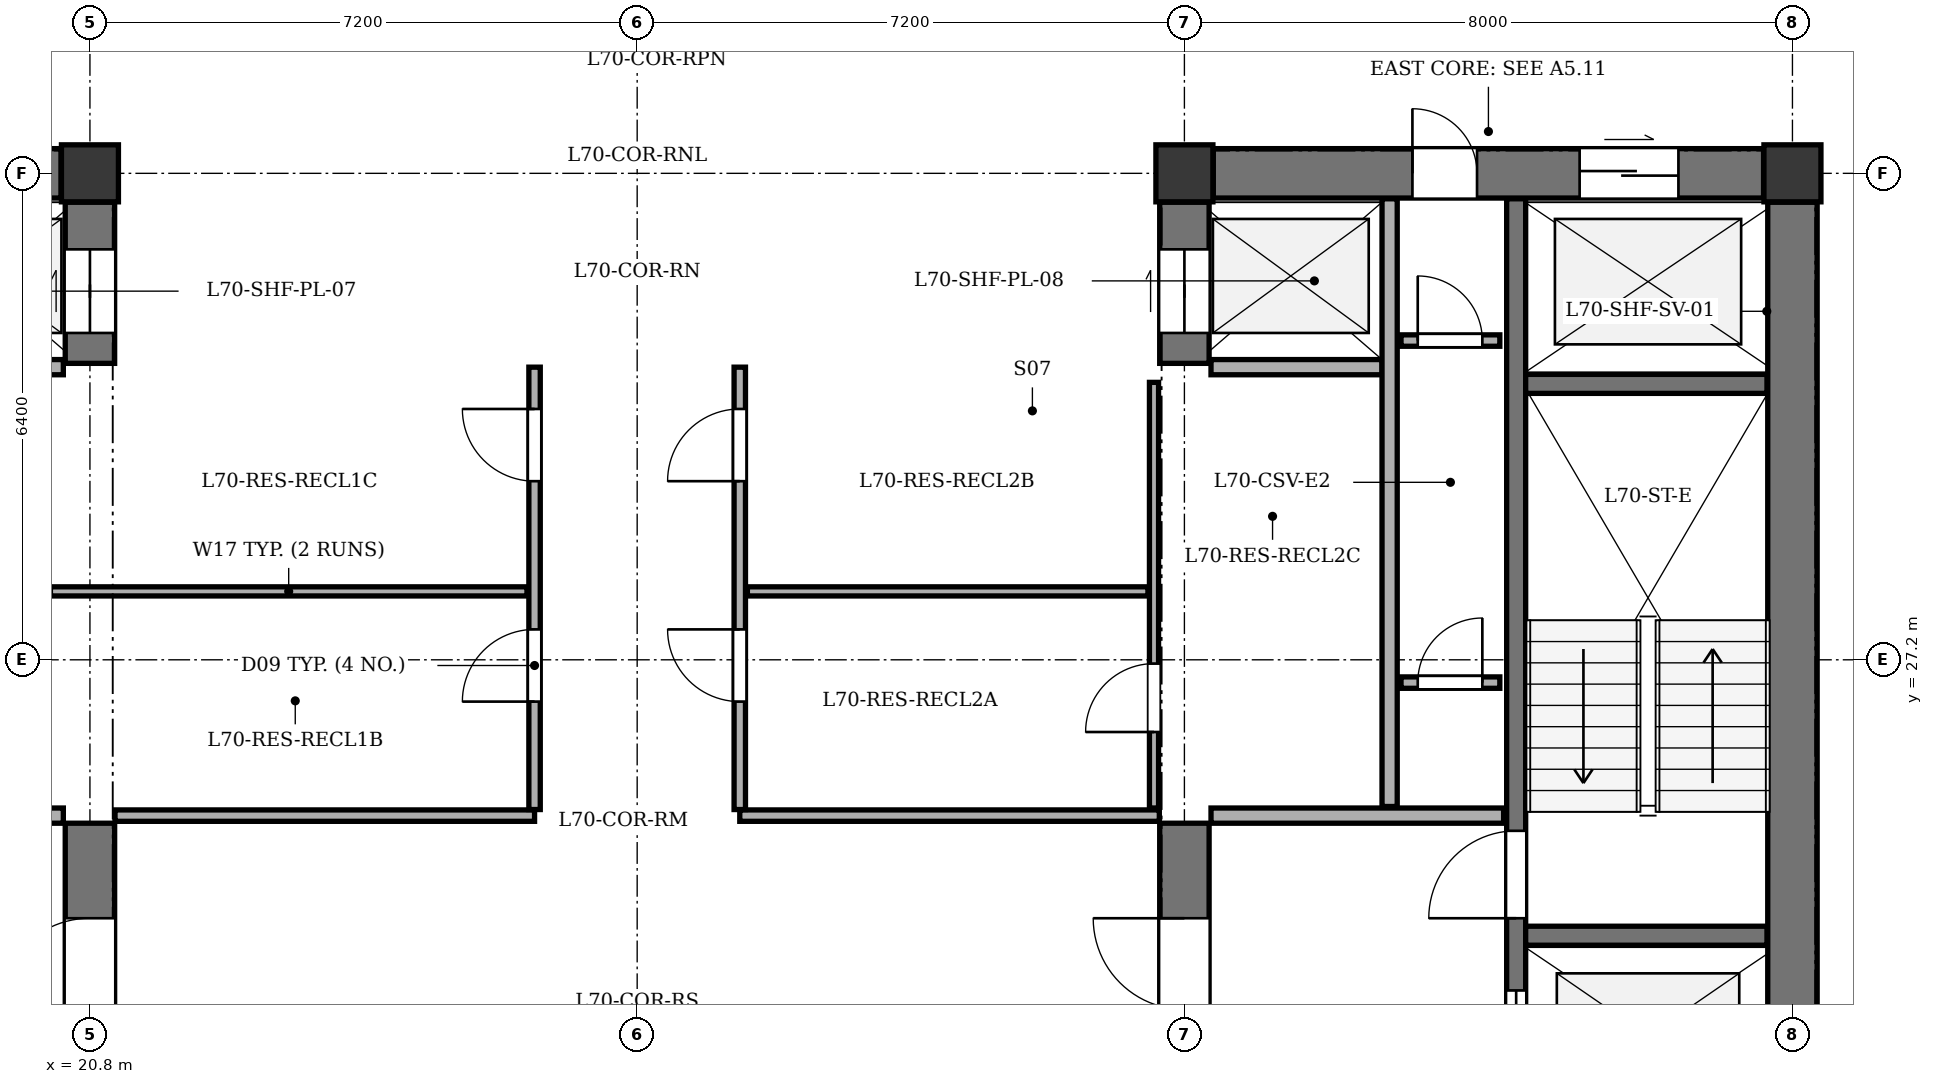
"""IFC4 building model, lengths in metres.
Left out: names, types, materials, properties, quantities, classifications, styles, units other than length and angle.
Written with IfcOpenShell. Run it as: python <this file> out.ifc"""

import sys

from ifc_helpers import new_model, si_unit, direction, frame, frame_2d, origin, origin_2d, place, context, subcontext, project, spatial, rectangle, extrude, element, fill, save


model = new_model("IFC4")
c1 = context("Model", 3, precision=1e-05, world=origin(), true_north=direction((0.0, 1.0)))
c2 = subcontext(c1, "Body", "Model", "MODEL_VIEW")
j1 = project(units=[si_unit("LENGTHUNIT", "METRE"), si_unit("PLANEANGLEUNIT", "RADIAN")], contexts=[c1])
p1 = place(None, origin())
s1 = spatial("IfcSite", under=j1, at=p1, CompositionType="ELEMENT")
p2 = place(p1, origin())
s2 = spatial("IfcBuilding", under=s1, at=p2, CompositionType="ELEMENT")
p3 = place(p2, frame((0.0, 0.0, 265.3)))
s3 = spatial("IfcBuildingStorey", under=s2, at=p3, CompositionType="ELEMENT", Elevation=265.3)
for number, where, z_axis, x_axis in (
    (1, (20.8, 33.6, 0.0), (0.0, 0.0, 1.0), (1.0, 0.0, 0.0)),
    (2, (35.2, 33.6, 0.0), (0.0, 0.0, 1.0), (1.0, 0.0, 0.0)),
    (3, (43.2, 33.6, 0.0), (0.0, 0.0, 1.0), (1.0, 0.0, 0.0)),
):
    element("IfcColumn", number, at=place(p3, frame(where, z_axis=z_axis, x_axis=x_axis)), inside=s3, PredefinedType="COLUMN", context=c2, shape_type="SweptSolid", body=[
        extrude(rectangle(XDim=0.75, YDim=0.75, at=origin_2d()), origin(), (0.0, 0.0, 1.0), 3.4),
    ])
p4 = place(p3, frame((13.18, 33.6, 0.0), z_axis=(0.0, 0.0, 1.0), x_axis=(1.0, 0.0, 0.0)))
e4 = element("IfcWall", 4, at=p4, inside=s3, PredefinedType="SHEAR", context=c2, shape_type="SweptSolid", body=[
    extrude(rectangle(XDim=7.24, YDim=0.65, at=frame_2d((3.62, 0.0))), origin(), (0.0, 0.0, 1.0), 2.95),
])
p5 = place(p4, frame((1.22, 0.0, 0.0)))
e5 = element("IfcOpeningElement", 5, at=p5, cuts=e4, PredefinedType="OPENING", context=c2, shape_type="SweptSolid", body=[
    extrude(rectangle(XDim=0.85, YDim=2.02, at=frame_2d((0.425, 1.01))), frame((0.0, 0.335, 0.0), z_axis=(0.0, -1.0, 0.0), x_axis=(1.0, 0.0, 0.0)), (0.0, 0.0, 1.0), 0.67),
])
p6 = place(p3, frame((20.8, 21.18, 0.0), z_axis=(0.0, 0.0, 1.0), x_axis=(0.0, 1.0, 0.0)))
e6 = element("IfcWall", 6, at=p6, inside=s3, PredefinedType="SHEAR", context=c2, shape_type="SweptSolid", body=[
    extrude(rectangle(XDim=3.87, YDim=0.65, at=frame_2d((1.935, 0.0))), origin(), (0.0, 0.0, 1.0), 2.95),
])
p7 = place(p6, frame((1.42, 0.0, 0.0)))
e7 = element("IfcOpeningElement", 7, at=p7, cuts=e6, PredefinedType="OPENING", context=c2, shape_type="SweptSolid", body=[
    extrude(rectangle(XDim=1.2, YDim=2.15, at=frame_2d((0.6, 1.075))), frame((0.0, 0.335, 0.0), z_axis=(0.0, -1.0, 0.0), x_axis=(1.0, 0.0, 0.0)), (0.0, 0.0, 1.0), 0.67),
])
p8 = place(p3, frame((20.8, 31.1, 0.0), z_axis=(0.0, 0.0, 1.0), x_axis=(0.0, 1.0, 0.0)))
e8 = element("IfcWall", 8, at=p8, inside=s3, PredefinedType="SHEAR", context=c2, shape_type="SweptSolid", body=[
    extrude(rectangle(XDim=2.12, YDim=0.65, at=frame_2d((1.06, 0.0))), origin(), (0.0, 0.0, 1.0), 2.95),
])
p9 = place(p8, frame((0.4, 0.0, 0.0)))
e9 = element("IfcOpeningElement", 9, at=p9, cuts=e8, PredefinedType="OPENING", context=c2, shape_type="SweptSolid", body=[
    extrude(rectangle(XDim=1.1, YDim=2.1, at=frame_2d((0.55, 1.05))), frame((0.0, 0.335, 0.0), z_axis=(0.0, -1.0, 0.0), x_axis=(1.0, 0.0, 0.0)), (0.0, 0.0, 1.0), 0.67),
])
for number, where, z_axis, x_axis in (
    (10, (16.6, 25.15, 0.0), (0.0, 0.0, 1.0), (1.0, 0.0, 0.0)),
    (11, (16.6, 31.05, 0.0), (0.0, 0.0, 1.0), (1.0, 0.0, 0.0)),
):
    element("IfcWall", number, at=place(p3, frame(where, z_axis=z_axis, x_axis=x_axis)), inside=s3, PredefinedType="SOLIDWALL", context=c2, shape_type="SweptSolid", body=[
        extrude(rectangle(XDim=3.85, YDim=0.2, at=frame_2d((1.925, 0.0))), origin(), (0.0, 0.0, 1.0), 2.95),
    ])
p10 = place(p3, frame((43.2, 21.18, 0.0), z_axis=(0.0, 0.0, 1.0), x_axis=(0.0, 1.0, 0.0)))
e12 = element("IfcWall", 12, at=p10, inside=s3, PredefinedType="SHEAR", context=c2, shape_type="SweptSolid", body=[
    extrude(rectangle(XDim=12.04, YDim=0.65, at=frame_2d((6.02, 0.0))), origin(), (0.0, 0.0, 1.0), 2.95),
])
p11 = place(p3, frame((35.58, 33.6, 0.0), z_axis=(0.0, 0.0, 1.0), x_axis=(1.0, 0.0, 0.0)))
e13 = element("IfcWall", 13, at=p11, inside=s3, PredefinedType="SHEAR", context=c2, shape_type="SweptSolid", body=[
    extrude(rectangle(XDim=7.24, YDim=0.65, at=frame_2d((3.62, 0.0))), origin(), (0.0, 0.0, 1.0), 2.95),
])
p12 = place(p11, frame((4.82, 0.0, 0.0)))
e14 = element("IfcOpeningElement", 14, at=p12, cuts=e13, PredefinedType="OPENING", context=c2, shape_type="SweptSolid", body=[
    extrude(rectangle(XDim=1.3, YDim=2.15, at=frame_2d((0.65, 1.075))), frame((0.0, 0.335, 0.0), z_axis=(0.0, -1.0, 0.0), x_axis=(1.0, 0.0, 0.0)), (0.0, 0.0, 1.0), 0.67),
])
p13 = place(p11, frame((2.62, 0.0, 0.0)))
e15 = element("IfcOpeningElement", 15, at=p13, cuts=e13, PredefinedType="OPENING", context=c2, shape_type="SweptSolid", body=[
    extrude(rectangle(XDim=0.85, YDim=2.02, at=frame_2d((0.425, 1.01))), frame((0.0, 0.335, 0.0), z_axis=(0.0, -1.0, 0.0), x_axis=(1.0, 0.0, 0.0)), (0.0, 0.0, 1.0), 0.67),
])
p14 = place(p3, frame((35.2, 21.18, 0.0), z_axis=(0.0, 0.0, 1.0), x_axis=(0.0, 1.0, 0.0)))
e16 = element("IfcWall", 16, at=p14, inside=s3, PredefinedType="SHEAR", context=c2, shape_type="SweptSolid", body=[
    extrude(rectangle(XDim=3.87, YDim=0.65, at=frame_2d((1.935, 0.0))), origin(), (0.0, 0.0, 1.0), 2.95),
])
p15 = place(p14, frame((1.42, 0.0, 0.0)))
e17 = element("IfcOpeningElement", 17, at=p15, cuts=e16, PredefinedType="OPENING", context=c2, shape_type="SweptSolid", body=[
    extrude(rectangle(XDim=1.2, YDim=2.15, at=frame_2d((0.6, 1.075))), frame((0.0, 0.335, 0.0), z_axis=(0.0, -1.0, 0.0), x_axis=(1.0, 0.0, 0.0)), (0.0, 0.0, 1.0), 0.67),
])
p16 = place(p3, frame((35.2, 31.1, 0.0), z_axis=(0.0, 0.0, 1.0), x_axis=(0.0, 1.0, 0.0)))
e18 = element("IfcWall", 18, at=p16, inside=s3, PredefinedType="SHEAR", context=c2, shape_type="SweptSolid", body=[
    extrude(rectangle(XDim=2.12, YDim=0.65, at=frame_2d((1.06, 0.0))), origin(), (0.0, 0.0, 1.0), 2.95),
])
p17 = place(p16, frame((0.4, 0.0, 0.0)))
e19 = element("IfcOpeningElement", 19, at=p17, cuts=e18, PredefinedType="OPENING", context=c2, shape_type="SweptSolid", body=[
    extrude(rectangle(XDim=1.1, YDim=2.1, at=frame_2d((0.55, 1.05))), frame((0.0, 0.335, 0.0), z_axis=(0.0, -1.0, 0.0), x_axis=(1.0, 0.0, 0.0)), (0.0, 0.0, 1.0), 0.67),
])
p18 = place(p3, frame((39.565, 21.135, 0.0), z_axis=(0.0, 0.0, 1.0), x_axis=(0.0, 1.0, 0.0)))
e20 = element("IfcWall", 20, at=p18, inside=s3, PredefinedType="SHEAR", context=c2, shape_type="SweptSolid", body=[
    extrude(rectangle(XDim=12.13, YDim=0.25, at=frame_2d((6.065, 0.0))), origin(), (0.0, 0.0, 1.0), 2.95),
])
p19 = place(p18, frame((0.515, 0.0, 0.0)))
e21 = element("IfcOpeningElement", 21, at=p19, cuts=e20, PredefinedType="OPENING", context=c2, shape_type="SweptSolid", body=[
    extrude(rectangle(XDim=1.2, YDim=2.15, at=frame_2d((0.6, 1.075))), frame((0.0, 0.135, 0.0), z_axis=(0.0, -1.0, 0.0), x_axis=(1.0, 0.0, 0.0)), (0.0, 0.0, 1.0), 0.27),
])
p20 = place(p18, frame((2.665, 0.0, 0.0)))
e22 = element("IfcOpeningElement", 22, at=p20, cuts=e20, PredefinedType="OPENING", context=c2, shape_type="SweptSolid", body=[
    extrude(rectangle(XDim=1.15, YDim=2.15, at=frame_2d((0.575, 1.075))), frame((0.0, 0.135, 0.0), z_axis=(0.0, -1.0, 0.0), x_axis=(1.0, 0.0, 0.0)), (0.0, 0.0, 1.0), 0.27),
])
for number, where, z_axis, x_axis in (
    (23, (39.69, 23.57, 0.0), (0.0, 0.0, 1.0), (1.0, 0.0, 0.0)),
    (24, (39.69, 30.83, 0.0), (0.0, 0.0, 1.0), (1.0, 0.0, 0.0)),
):
    element("IfcWall", number, at=place(p3, frame(where, z_axis=z_axis, x_axis=x_axis)), inside=s3, PredefinedType="SHEAR", context=c2, shape_type="SweptSolid", body=[
        extrude(rectangle(XDim=3.175, YDim=0.25, at=frame_2d((1.587, 0.0))), origin(), (0.0, 0.0, 1.0), 2.95),
    ])
p21 = place(p3, frame((35.55, 25.15, 0.0), z_axis=(0.0, 0.0, 1.0), x_axis=(1.0, 0.0, 0.0)))
e25 = element("IfcWall", 25, at=p21, inside=s3, PredefinedType="SOLIDWALL", context=c2, shape_type="SweptSolid", body=[
    extrude(rectangle(XDim=3.85, YDim=0.2, at=frame_2d((1.925, 0.0))), origin(), (0.0, 0.0, 1.0), 2.95),
])
p22 = place(p3, frame((35.55, 31.05, 0.0), z_axis=(0.0, 0.0, 1.0), x_axis=(1.0, 0.0, 0.0)))
e26 = element("IfcWall", 26, at=p22, inside=s3, PredefinedType="SOLIDWALL", context=c2, shape_type="SweptSolid", body=[
    extrude(rectangle(XDim=2.25, YDim=0.2, at=frame_2d((1.125, 0.0))), origin(), (0.0, 0.0, 1.0), 2.95),
])
p23 = place(p3, frame((37.9, 25.27, 0.0), z_axis=(0.0, 0.0, 1.0), x_axis=(0.0, 1.0, 0.0)))
e27 = element("IfcWall", 27, at=p23, inside=s3, PredefinedType="SOLIDWALL", context=c2, shape_type="SweptSolid", body=[
    extrude(rectangle(XDim=7.995, YDim=0.2, at=frame_2d((3.998, 0.0))), origin(), (0.0, 0.0, 1.0), 2.95),
])
p24 = place(p3, frame((38.05, 26.9, 0.0), z_axis=(0.0, 0.0, 1.0), x_axis=(1.0, 0.0, 0.0)))
e28 = element("IfcWall", 28, at=p24, inside=s3, PredefinedType="PARTITIONING", context=c2, shape_type="SweptSolid", body=[
    extrude(rectangle(XDim=1.3, YDim=0.15, at=frame_2d((0.65, 0.0))), origin(), (0.0, 0.0, 1.0), 2.95),
])
p25 = place(p24, frame((0.22, 0.0, 0.0)))
e29 = element("IfcOpeningElement", 29, at=p25, cuts=e28, PredefinedType="OPENING", context=c2, shape_type="SweptSolid", body=[
    extrude(rectangle(XDim=0.85, YDim=2.02, at=frame_2d((0.425, 1.01))), frame((0.0, 0.085, 0.0), z_axis=(0.0, -1.0, 0.0), x_axis=(1.0, 0.0, 0.0)), (0.0, 0.0, 1.0), 0.17),
])
p26 = place(p3, frame((38.05, 31.4, 0.0), z_axis=(0.0, 0.0, 1.0), x_axis=(1.0, 0.0, 0.0)))
e30 = element("IfcWall", 30, at=p26, inside=s3, PredefinedType="PARTITIONING", context=c2, shape_type="SweptSolid", body=[
    extrude(rectangle(XDim=1.3, YDim=0.15, at=frame_2d((0.65, 0.0))), origin(), (0.0, 0.0, 1.0), 2.95),
])
p27 = place(p26, frame((0.22, 0.0, 0.0)))
e31 = element("IfcOpeningElement", 31, at=p27, cuts=e30, PredefinedType="OPENING", context=c2, shape_type="SweptSolid", body=[
    extrude(rectangle(XDim=0.85, YDim=2.02, at=frame_2d((0.425, 1.01))), frame((0.0, 0.085, 0.0), z_axis=(0.0, -1.0, 0.0), x_axis=(1.0, 0.0, 0.0)), (0.0, 0.0, 1.0), 0.17),
])
for number, where, z_axis, x_axis in (
    (32, (21.13, 25.15, 0.0), (0.0, 0.0, 1.0), (1.0, 0.0, 0.0)),
    (33, (29.35, 25.15, 0.0), (0.0, 0.0, 1.0), (1.0, 0.0, 0.0)),
):
    element("IfcWall", number, at=place(p3, frame(where, z_axis=z_axis, x_axis=x_axis)), inside=s3, PredefinedType="PARTITIONING", context=c2, shape_type="SweptSolid", body=[
        extrude(rectangle(XDim=5.52, YDim=0.15, at=frame_2d((2.76, 0.0))), origin(), (0.0, 0.0, 1.0), 2.95),
    ])
p28 = place(p3, frame((26.65, 25.23, 0.0), z_axis=(0.0, 0.0, 1.0), x_axis=(0.0, 1.0, 0.0)))
e34 = element("IfcWall", 34, at=p28, inside=s3, PredefinedType="PARTITIONING", context=c2, shape_type="SweptSolid", body=[
    extrude(rectangle(XDim=5.82, YDim=0.15, at=frame_2d((2.91, 0.0))), origin(), (0.0, 0.0, 1.0), 2.95),
])
p29 = place(p28, frame((1.42, 0.0, 0.0)))
e35 = element("IfcOpeningElement", 35, at=p29, cuts=e34, PredefinedType="OPENING", context=c2, shape_type="SweptSolid", body=[
    extrude(rectangle(XDim=0.95, YDim=2.1, at=frame_2d((0.475, 1.05))), frame((0.0, 0.085, 0.0), z_axis=(0.0, -1.0, 0.0), x_axis=(1.0, 0.0, 0.0)), (0.0, 0.0, 1.0), 0.17),
])
p30 = place(p28, frame((4.32, 0.0, 0.0)))
e36 = element("IfcOpeningElement", 36, at=p30, cuts=e34, PredefinedType="OPENING", context=c2, shape_type="SweptSolid", body=[
    extrude(rectangle(XDim=0.95, YDim=2.1, at=frame_2d((0.475, 1.05))), frame((0.0, 0.085, 0.0), z_axis=(0.0, -1.0, 0.0), x_axis=(1.0, 0.0, 0.0)), (0.0, 0.0, 1.0), 0.17),
])
p31 = place(p3, frame((20.28, 28.1, 0.0), z_axis=(0.0, 0.0, 1.0), x_axis=(1.0, 0.0, 0.0)))
e37 = element("IfcWall", 37, at=p31, inside=s3, PredefinedType="PARTITIONING", context=c2, shape_type="SweptSolid", body=[
    extrude(rectangle(XDim=6.27, YDim=0.12, at=frame_2d((3.135, 0.0))), origin(), (0.0, 0.0, 1.0), 2.95),
])
p32 = place(p3, frame((29.35, 25.23, 0.0), z_axis=(0.0, 0.0, 1.0), x_axis=(0.0, 1.0, 0.0)))
e38 = element("IfcWall", 38, at=p32, inside=s3, PredefinedType="PARTITIONING", context=c2, shape_type="SweptSolid", body=[
    extrude(rectangle(XDim=5.82, YDim=0.15, at=frame_2d((2.91, 0.0))), origin(), (0.0, 0.0, 1.0), 2.95),
])
p33 = place(p32, frame((1.42, 0.0, 0.0)))
e39 = element("IfcOpeningElement", 39, at=p33, cuts=e38, PredefinedType="OPENING", context=c2, shape_type="SweptSolid", body=[
    extrude(rectangle(XDim=0.95, YDim=2.1, at=frame_2d((0.475, 1.05))), frame((0.0, 0.085, 0.0), z_axis=(0.0, -1.0, 0.0), x_axis=(1.0, 0.0, 0.0)), (0.0, 0.0, 1.0), 0.17),
])
p34 = place(p32, frame((4.32, 0.0, 0.0)))
e40 = element("IfcOpeningElement", 40, at=p34, cuts=e38, PredefinedType="OPENING", context=c2, shape_type="SweptSolid", body=[
    extrude(rectangle(XDim=0.95, YDim=2.1, at=frame_2d((0.475, 1.05))), frame((0.0, 0.085, 0.0), z_axis=(0.0, -1.0, 0.0), x_axis=(1.0, 0.0, 0.0)), (0.0, 0.0, 1.0), 0.17),
])
p35 = place(p3, frame((34.8, 25.25, 0.0), z_axis=(0.0, 0.0, 1.0), x_axis=(0.0, 1.0, 0.0)))
e41 = element("IfcWall", 41, at=p35, inside=s3, PredefinedType="PARTITIONING", context=c2, shape_type="SweptSolid", body=[
    extrude(rectangle(XDim=5.6, YDim=0.12, at=frame_2d((2.8, 0.0))), origin(), (0.0, 0.0, 1.0), 2.95),
])
p36 = place(p35, frame((1.0, 0.0, 0.0)))
e42 = element("IfcOpeningElement", 42, at=p36, cuts=e41, PredefinedType="OPENING", context=c2, shape_type="SweptSolid", body=[
    extrude(rectangle(XDim=0.9, YDim=2.05, at=frame_2d((0.45, 1.025))), frame((0.0, 0.07, 0.0), z_axis=(0.0, -1.0, 0.0), x_axis=(1.0, 0.0, 0.0)), (0.0, 0.0, 1.0), 0.14),
])
p37 = place(p3, frame((29.45, 28.1, 0.0), z_axis=(0.0, 0.0, 1.0), x_axis=(1.0, 0.0, 0.0)))
e43 = element("IfcWall", 43, at=p37, inside=s3, PredefinedType="PARTITIONING", context=c2, shape_type="SweptSolid", body=[
    extrude(rectangle(XDim=5.27, YDim=0.12, at=frame_2d((2.635, 0.0))), origin(), (0.0, 0.0, 1.0), 2.95),
])
p38 = place(p7, origin())
e44 = element("IfcDoor", 44, at=p38, inside=s3, OperationType="SINGLE_SWING_LEFT", PredefinedType="DOOR", context=c2, shape_type="SweptSolid", body=[
    extrude(rectangle(XDim=1.2, YDim=2.15, at=frame_2d((0.6, 1.075))), frame((0.0, 0.025, 0.0), z_axis=(0.0, -1.0, 0.0), x_axis=(1.0, 0.0, 0.0)), (0.0, 0.0, 1.0), 0.05),
])
fill(e7, e44)
p39 = place(p9, origin())
e45 = element("IfcDoor", 45, at=p39, inside=s3, OperationType="DOUBLE_DOOR_SLIDING", PredefinedType="DOOR", context=c2, shape_type="SweptSolid", body=[
    extrude(rectangle(XDim=1.1, YDim=2.1, at=frame_2d((0.55, 1.05))), frame((0.0, 0.025, 0.0), z_axis=(0.0, -1.0, 0.0), x_axis=(1.0, 0.0, 0.0)), (0.0, 0.0, 1.0), 0.05),
])
fill(e9, e45)
p40 = place(p12, origin())
e46 = element("IfcDoor", 46, at=p40, inside=s3, OperationType="DOUBLE_DOOR_SLIDING", PredefinedType="DOOR", context=c2, shape_type="SweptSolid", body=[
    extrude(rectangle(XDim=1.3, YDim=2.15, at=frame_2d((0.65, 1.075))), frame((0.0, 0.025, 0.0), z_axis=(0.0, -1.0, 0.0), x_axis=(1.0, 0.0, 0.0)), (0.0, 0.0, 1.0), 0.05),
])
fill(e14, e46)
p41 = place(p13, origin())
e47 = element("IfcDoor", 47, at=p41, inside=s3, OperationType="SINGLE_SWING_LEFT", PredefinedType="DOOR", context=c2, shape_type="SweptSolid", body=[
    extrude(rectangle(XDim=0.85, YDim=2.02, at=frame_2d((0.425, 1.01))), frame((0.0, 0.025, 0.0), z_axis=(0.0, -1.0, 0.0), x_axis=(1.0, 0.0, 0.0)), (0.0, 0.0, 1.0), 0.05),
])
fill(e15, e47)
p42 = place(p15, origin())
e48 = element("IfcDoor", 48, at=p42, inside=s3, OperationType="SINGLE_SWING_RIGHT", PredefinedType="DOOR", context=c2, shape_type="SweptSolid", body=[
    extrude(rectangle(XDim=1.2, YDim=2.15, at=frame_2d((0.6, 1.075))), frame((0.0, 0.025, 0.0), z_axis=(0.0, -1.0, 0.0), x_axis=(1.0, 0.0, 0.0)), (0.0, 0.0, 1.0), 0.05),
])
fill(e17, e48)
p43 = place(p17, origin())
e49 = element("IfcDoor", 49, at=p43, inside=s3, OperationType="DOUBLE_DOOR_SLIDING", PredefinedType="DOOR", context=c2, shape_type="SweptSolid", body=[
    extrude(rectangle(XDim=1.1, YDim=2.1, at=frame_2d((0.55, 1.05))), frame((0.0, 0.025, 0.0), z_axis=(0.0, -1.0, 0.0), x_axis=(1.0, 0.0, 0.0)), (0.0, 0.0, 1.0), 0.05),
])
fill(e19, e49)
p44 = place(p19, origin())
e50 = element("IfcDoor", 50, at=p44, inside=s3, OperationType="DOUBLE_DOOR_SLIDING", PredefinedType="DOOR", context=c2, shape_type="SweptSolid", body=[
    extrude(rectangle(XDim=1.2, YDim=2.15, at=frame_2d((0.6, 1.075))), frame((0.0, 0.025, 0.0), z_axis=(0.0, -1.0, 0.0), x_axis=(1.0, 0.0, 0.0)), (0.0, 0.0, 1.0), 0.05),
])
fill(e21, e50)
p45 = place(p20, origin())
e51 = element("IfcDoor", 51, at=p45, inside=s3, OperationType="SINGLE_SWING_LEFT", PredefinedType="DOOR", context=c2, shape_type="SweptSolid", body=[
    extrude(rectangle(XDim=1.15, YDim=2.15, at=frame_2d((0.575, 1.075))), frame((0.0, 0.025, 0.0), z_axis=(0.0, -1.0, 0.0), x_axis=(1.0, 0.0, 0.0)), (0.0, 0.0, 1.0), 0.05),
])
fill(e22, e51)
p46 = place(p25, origin())
e52 = element("IfcDoor", 52, at=p46, inside=s3, OperationType="SINGLE_SWING_RIGHT", PredefinedType="DOOR", context=c2, shape_type="SweptSolid", body=[
    extrude(rectangle(XDim=0.85, YDim=2.02, at=frame_2d((0.425, 1.01))), frame((0.0, 0.025, 0.0), z_axis=(0.0, -1.0, 0.0), x_axis=(1.0, 0.0, 0.0)), (0.0, 0.0, 1.0), 0.05),
])
fill(e29, e52)
p47 = place(p27, origin())
e53 = element("IfcDoor", 53, at=p47, inside=s3, OperationType="SINGLE_SWING_LEFT", PredefinedType="DOOR", context=c2, shape_type="SweptSolid", body=[
    extrude(rectangle(XDim=0.85, YDim=2.02, at=frame_2d((0.425, 1.01))), frame((0.0, 0.025, 0.0), z_axis=(0.0, -1.0, 0.0), x_axis=(1.0, 0.0, 0.0)), (0.0, 0.0, 1.0), 0.05),
])
fill(e31, e53)
p48 = place(p29, origin())
e54 = element("IfcDoor", 54, at=p48, inside=s3, OperationType="SINGLE_SWING_LEFT", PredefinedType="DOOR", context=c2, shape_type="SweptSolid", body=[
    extrude(rectangle(XDim=0.95, YDim=2.1, at=frame_2d((0.475, 1.05))), frame((0.0, 0.025, 0.0), z_axis=(0.0, -1.0, 0.0), x_axis=(1.0, 0.0, 0.0)), (0.0, 0.0, 1.0), 0.05),
])
fill(e35, e54)
p49 = place(p30, origin())
e55 = element("IfcDoor", 55, at=p49, inside=s3, OperationType="SINGLE_SWING_RIGHT", PredefinedType="DOOR", context=c2, shape_type="SweptSolid", body=[
    extrude(rectangle(XDim=0.95, YDim=2.1, at=frame_2d((0.475, 1.05))), frame((0.0, 0.025, 0.0), z_axis=(0.0, -1.0, 0.0), x_axis=(1.0, 0.0, 0.0)), (0.0, 0.0, 1.0), 0.05),
])
fill(e36, e55)
p50 = place(p36, origin())
e56 = element("IfcDoor", 56, at=p50, inside=s3, OperationType="SINGLE_SWING_LEFT", PredefinedType="DOOR", context=c2, shape_type="SweptSolid", body=[
    extrude(rectangle(XDim=0.9, YDim=2.05, at=frame_2d((0.45, 1.025))), frame((0.0, 0.025, 0.0), z_axis=(0.0, -1.0, 0.0), x_axis=(1.0, 0.0, 0.0)), (0.0, 0.0, 1.0), 0.05),
])
fill(e42, e56)
p51 = place(p33, origin())
e57 = element("IfcDoor", 57, at=p51, inside=s3, OperationType="SINGLE_SWING_RIGHT", PredefinedType="DOOR", context=c2, shape_type="SweptSolid", body=[
    extrude(rectangle(XDim=0.95, YDim=2.1, at=frame_2d((0.475, 1.05))), frame((0.0, 0.025, 0.0), z_axis=(0.0, -1.0, 0.0), x_axis=(1.0, 0.0, 0.0)), (0.0, 0.0, 1.0), 0.05),
])
fill(e39, e57)
p52 = place(p34, origin())
e58 = element("IfcDoor", 58, at=p52, inside=s3, OperationType="SINGLE_SWING_LEFT", PredefinedType="DOOR", context=c2, shape_type="SweptSolid", body=[
    extrude(rectangle(XDim=0.95, YDim=2.1, at=frame_2d((0.475, 1.05))), frame((0.0, 0.025, 0.0), z_axis=(0.0, -1.0, 0.0), x_axis=(1.0, 0.0, 0.0)), (0.0, 0.0, 1.0), 0.05),
])
fill(e40, e58)
save(model, sys.argv[1])
